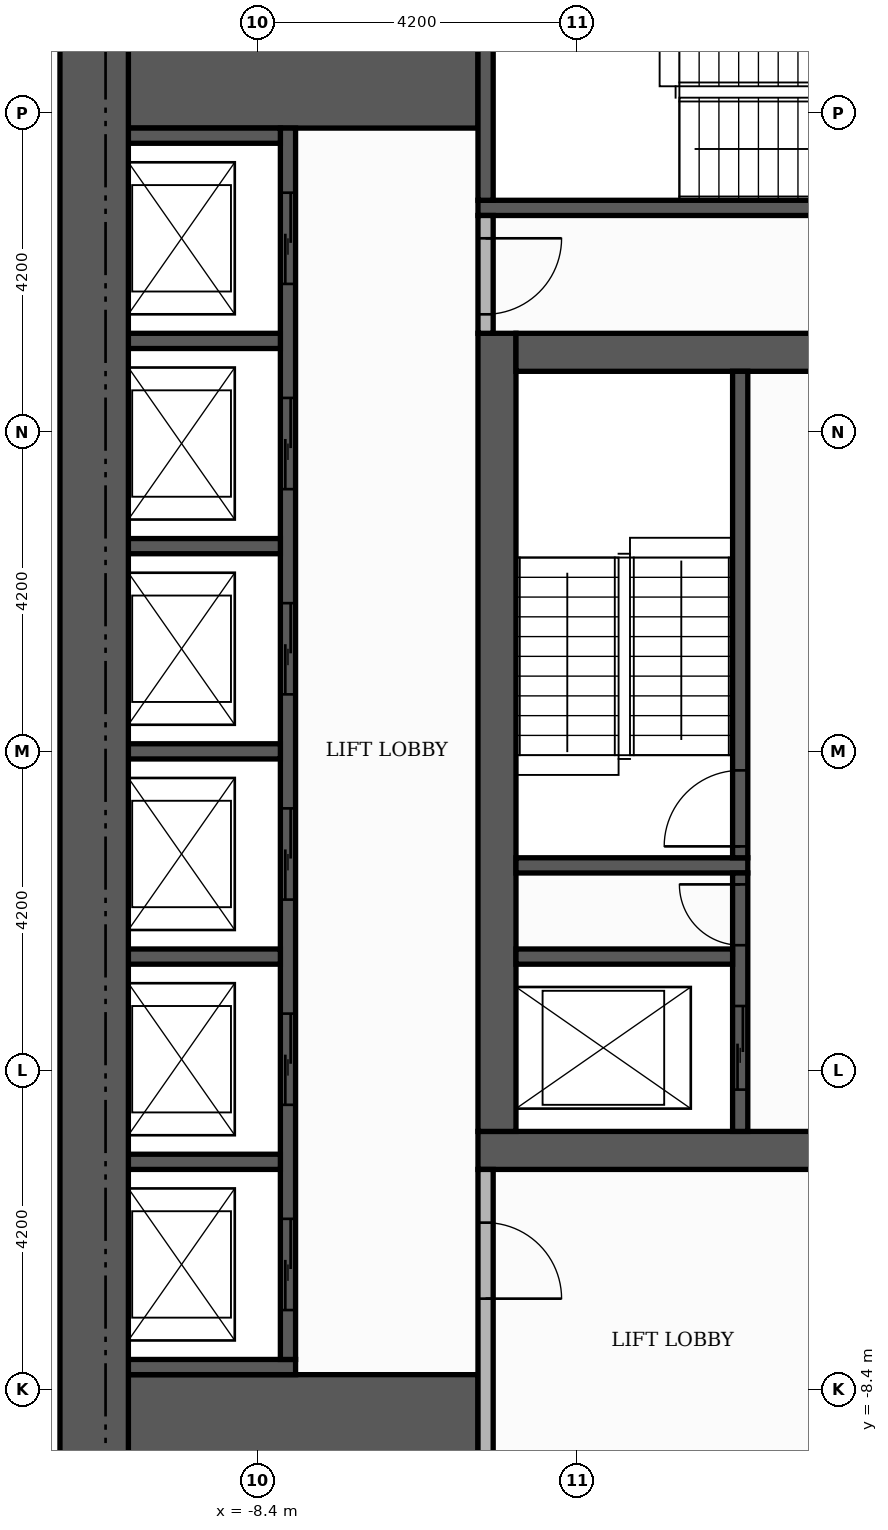
"""IFC4 building model, lengths in metres.
Left out: names, types, materials, properties, quantities, classifications, styles, units other than length and angle.
Written with IfcOpenShell. Run it as: python <this file> out.ifc"""

import sys

from ifc_helpers import new_model, si_unit, direction, frame, frame_2d, origin, place, context, subcontext, project, spatial, rectangle, extrude, element, fill, save


model = new_model("IFC4")
c1 = context("Model", 3, precision=1e-05, world=origin(), true_north=direction((0.0, 1.0)))
c2 = subcontext(c1, "Body", "Model", "MODEL_VIEW")
j1 = project(units=[si_unit("LENGTHUNIT", "METRE"), si_unit("PLANEANGLEUNIT", "RADIAN")], contexts=[c1])
p1 = place(None, origin())
s1 = spatial("IfcSite", under=j1, at=p1, CompositionType="ELEMENT")
p2 = place(p1, origin())
s2 = spatial("IfcBuilding", under=s1, at=p2, CompositionType="ELEMENT")
p3 = place(p2, frame((0.0, 0.0, 54.3)))
s3 = spatial("IfcBuildingStorey", under=s2, at=p3, CompositionType="ELEMENT", Elevation=54.3)
p4 = place(p3, frame((-5.5, -5.25, 0.0), z_axis=(0.0, 0.0, 1.0), x_axis=(1.0, 0.0, 0.0)))
e1 = element("IfcWall", 1, at=p4, inside=s3, PredefinedType="SHEAR", context=c2, shape_type="SweptSolid", body=[
    extrude(rectangle(XDim=11.0, YDim=0.5, at=frame_2d((5.5, 0.0))), origin(), (0.0, 0.0, 1.0), 3.48),
])
p5 = place(p4, frame((4.9, 0.0, 0.0)))
e2 = element("IfcOpeningElement", 2, at=p5, cuts=e1, PredefinedType="OPENING", context=c2, shape_type="SweptSolid", body=[
    extrude(rectangle(XDim=1.2, YDim=2.1, at=frame_2d((0.6, 1.05))), frame((0.0, 0.26, 0.0), z_axis=(0.0, -1.0, 0.0), x_axis=(1.0, 0.0, 0.0)), (0.0, 0.0, 1.0), 0.52),
])
p6 = place(p3, frame((-5.25, -5.0, 0.0), z_axis=(0.0, 0.0, 1.0), x_axis=(0.0, 1.0, 0.0)))
e3 = element("IfcWall", 3, at=p6, inside=s3, PredefinedType="SHEAR", context=c2, shape_type="SweptSolid", body=[
    extrude(rectangle(XDim=10.5, YDim=0.5, at=frame_2d((5.25, 0.0))), origin(), (0.0, 0.0, 1.0), 3.48),
])
p7 = place(p3, frame((-5.0, 5.25, 0.0), z_axis=(0.0, 0.0, 1.0), x_axis=(1.0, 0.0, 0.0)))
e4 = element("IfcWall", 4, at=p7, inside=s3, PredefinedType="SHEAR", context=c2, shape_type="SweptSolid", body=[
    extrude(rectangle(XDim=10.0, YDim=0.5, at=frame_2d((5.0, 0.0))), origin(), (0.0, 0.0, 1.0), 3.48),
])
p8 = place(p7, frame((4.4, 0.0, 0.0)))
e5 = element("IfcOpeningElement", 5, at=p8, cuts=e4, PredefinedType="OPENING", context=c2, shape_type="SweptSolid", body=[
    extrude(rectangle(XDim=1.2, YDim=2.1, at=frame_2d((0.6, 1.05))), frame((0.0, 0.26, 0.0), z_axis=(0.0, -1.0, 0.0), x_axis=(1.0, 0.0, 0.0)), (0.0, 0.0, 1.0), 0.52),
])
for number, where, z_axis, x_axis in (
    (6, (-10.1, -9.15, 0.0), (0.0, 0.0, 1.0), (1.0, 0.0, 0.0)),
    (7, (-10.1, 9.15, 0.0), (0.0, 0.0, 1.0), (1.0, 0.0, 0.0)),
):
    element("IfcWall", number, at=place(p3, frame(where, z_axis=z_axis, x_axis=x_axis)), inside=s3, PredefinedType="SHEAR", context=c2, shape_type="SweptSolid", body=[
        extrude(rectangle(XDim=4.6, YDim=1.9, at=frame_2d((2.3, 0.0))), origin(), (0.0, 0.0, 1.0), 3.48),
    ])
p9 = place(p3, frame((-5.0, -1.5, 0.0), z_axis=(0.0, 0.0, 1.0), x_axis=(1.0, 0.0, 0.0)))
e8 = element("IfcWall", 8, at=p9, inside=s3, PredefinedType="SHEAR", context=c2, shape_type="SweptSolid", body=[
    extrude(rectangle(XDim=3.05, YDim=0.2, at=frame_2d((1.525, 0.0))), origin(), (0.0, 0.0, 1.0), 3.48),
])
p10 = place(p3, frame((-2.05, -1.4, 0.0), z_axis=(0.0, 0.0, 1.0), x_axis=(0.0, 1.0, 0.0)))
e9 = element("IfcWall", 9, at=p10, inside=s3, PredefinedType="SHEAR", context=c2, shape_type="SweptSolid", body=[
    extrude(rectangle(XDim=6.4, YDim=0.2, at=frame_2d((3.2, 0.0))), origin(), (0.0, 0.0, 1.0), 3.48),
])
p11 = place(p10, frame((0.15, 0.0, 0.0)))
e10 = element("IfcOpeningElement", 10, at=p11, cuts=e9, PredefinedType="OPENING", context=c2, shape_type="SweptSolid", body=[
    extrude(rectangle(XDim=1.0, YDim=2.1, at=frame_2d((0.5, 1.05))), frame((0.0, 0.11, 0.0), z_axis=(0.0, -1.0, 0.0), x_axis=(1.0, 0.0, 0.0)), (0.0, 0.0, 1.0), 0.22),
])
p12 = place(p3, frame((-5.5, 7.15, 0.0), z_axis=(0.0, 0.0, 1.0), x_axis=(1.0, 0.0, 0.0)))
e11 = element("IfcWall", 11, at=p12, inside=s3, PredefinedType="SHEAR", context=c2, shape_type="SweptSolid", body=[
    extrude(rectangle(XDim=6.8, YDim=0.2, at=frame_2d((3.4, 0.0))), origin(), (0.0, 0.0, 1.0), 3.48),
])
p13 = place(p3, frame((-5.4, 7.25, 0.0), z_axis=(0.0, 0.0, 1.0), x_axis=(0.0, 1.0, 0.0)))
e12 = element("IfcWall", 12, at=p13, inside=s3, PredefinedType="SHEAR", context=c2, shape_type="SweptSolid", body=[
    extrude(rectangle(XDim=2.85, YDim=0.2, at=frame_2d((1.425, 0.0))), origin(), (0.0, 0.0, 1.0), 3.48),
])
p14 = place(p3, frame((-10.1, -8.1, 0.0), z_axis=(0.0, 0.0, 1.0), x_axis=(1.0, 0.0, 0.0)))
e13 = element("IfcWall", 13, at=p14, inside=s3, PredefinedType="SHEAR", context=c2, shape_type="SweptSolid", body=[
    extrude(rectangle(XDim=2.2, YDim=0.2, at=frame_2d((1.1, 0.0))), origin(), (0.0, 0.0, 1.0), 3.48),
])
p15 = place(p3, frame((-8.0, -8.0, 0.0), z_axis=(0.0, 0.0, 1.0), x_axis=(0.0, 1.0, 0.0)))
e14 = element("IfcWall", 14, at=p15, inside=s3, PredefinedType="SHEAR", context=c2, shape_type="SweptSolid", body=[
    extrude(rectangle(XDim=16.2, YDim=0.2, at=frame_2d((8.1, 0.0))), origin(), (0.0, 0.0, 1.0), 3.48),
])
p16 = place(p15, frame((0.65, 0.0, 0.0)))
e15 = element("IfcOpeningElement", 15, at=p16, cuts=e14, PredefinedType="OPENING", context=c2, shape_type="SweptSolid", body=[
    extrude(rectangle(XDim=1.2, YDim=2.1, at=frame_2d((0.6, 1.05))), frame((0.0, 0.11, 0.0), z_axis=(0.0, -1.0, 0.0), x_axis=(1.0, 0.0, 0.0)), (0.0, 0.0, 1.0), 0.22),
])
p17 = place(p15, frame((3.35, 0.0, 0.0)))
e16 = element("IfcOpeningElement", 16, at=p17, cuts=e14, PredefinedType="OPENING", context=c2, shape_type="SweptSolid", body=[
    extrude(rectangle(XDim=1.2, YDim=2.1, at=frame_2d((0.6, 1.05))), frame((0.0, 0.11, 0.0), z_axis=(0.0, -1.0, 0.0), x_axis=(1.0, 0.0, 0.0)), (0.0, 0.0, 1.0), 0.22),
])
p18 = place(p15, frame((6.05, 0.0, 0.0)))
e17 = element("IfcOpeningElement", 17, at=p18, cuts=e14, PredefinedType="OPENING", context=c2, shape_type="SweptSolid", body=[
    extrude(rectangle(XDim=1.2, YDim=2.1, at=frame_2d((0.6, 1.05))), frame((0.0, 0.11, 0.0), z_axis=(0.0, -1.0, 0.0), x_axis=(1.0, 0.0, 0.0)), (0.0, 0.0, 1.0), 0.22),
])
p19 = place(p15, frame((8.75, 0.0, 0.0)))
e18 = element("IfcOpeningElement", 18, at=p19, cuts=e14, PredefinedType="OPENING", context=c2, shape_type="SweptSolid", body=[
    extrude(rectangle(XDim=1.2, YDim=2.1, at=frame_2d((0.6, 1.05))), frame((0.0, 0.11, 0.0), z_axis=(0.0, -1.0, 0.0), x_axis=(1.0, 0.0, 0.0)), (0.0, 0.0, 1.0), 0.22),
])
p20 = place(p15, frame((11.45, 0.0, 0.0)))
e19 = element("IfcOpeningElement", 19, at=p20, cuts=e14, PredefinedType="OPENING", context=c2, shape_type="SweptSolid", body=[
    extrude(rectangle(XDim=1.2, YDim=2.1, at=frame_2d((0.6, 1.05))), frame((0.0, 0.11, 0.0), z_axis=(0.0, -1.0, 0.0), x_axis=(1.0, 0.0, 0.0)), (0.0, 0.0, 1.0), 0.22),
])
p21 = place(p15, frame((14.15, 0.0, 0.0)))
e20 = element("IfcOpeningElement", 20, at=p21, cuts=e14, PredefinedType="OPENING", context=c2, shape_type="SweptSolid", body=[
    extrude(rectangle(XDim=1.2, YDim=2.1, at=frame_2d((0.6, 1.05))), frame((0.0, 0.11, 0.0), z_axis=(0.0, -1.0, 0.0), x_axis=(1.0, 0.0, 0.0)), (0.0, 0.0, 1.0), 0.22),
])
p22 = place(p3, frame((-10.1, -5.4, 0.0), z_axis=(0.0, 0.0, 1.0), x_axis=(1.0, 0.0, 0.0)))
e21 = element("IfcWall", 21, at=p22, inside=s3, PredefinedType="SHEAR", context=c2, shape_type="SweptSolid", body=[
    extrude(rectangle(XDim=2.0, YDim=0.2, at=frame_2d((1.0, 0.0))), origin(), (0.0, 0.0, 1.0), 3.48),
])
p23 = place(p3, frame((-2.05, -5.0, 0.0), z_axis=(0.0, 0.0, 1.0), x_axis=(0.0, 1.0, 0.0)))
e22 = element("IfcWall", 22, at=p23, inside=s3, PredefinedType="SHEAR", context=c2, shape_type="SweptSolid", body=[
    extrude(rectangle(XDim=3.4, YDim=0.2, at=frame_2d((1.7, 0.0))), origin(), (0.0, 0.0, 1.0), 3.48),
])
p24 = place(p23, frame((0.55, 0.0, 0.0)))
e23 = element("IfcOpeningElement", 23, at=p24, cuts=e22, PredefinedType="OPENING", context=c2, shape_type="SweptSolid", body=[
    extrude(rectangle(XDim=1.1, YDim=2.1, at=frame_2d((0.55, 1.05))), frame((0.0, 0.11, 0.0), z_axis=(0.0, -1.0, 0.0), x_axis=(1.0, 0.0, 0.0)), (0.0, 0.0, 1.0), 0.22),
])
p25 = place(p23, frame((2.45, 0.0, 0.0)))
e24 = element("IfcOpeningElement", 24, at=p25, cuts=e22, PredefinedType="OPENING", context=c2, shape_type="SweptSolid", body=[
    extrude(rectangle(XDim=0.8, YDim=2.1, at=frame_2d((0.4, 1.05))), frame((0.0, 0.11, 0.0), z_axis=(0.0, -1.0, 0.0), x_axis=(1.0, 0.0, 0.0)), (0.0, 0.0, 1.0), 0.22),
])
p26 = place(p3, frame((-10.1, -2.7, 0.0), z_axis=(0.0, 0.0, 1.0), x_axis=(1.0, 0.0, 0.0)))
e25 = element("IfcWall", 25, at=p26, inside=s3, PredefinedType="SHEAR", context=c2, shape_type="SweptSolid", body=[
    extrude(rectangle(XDim=2.0, YDim=0.2, at=frame_2d((1.0, 0.0))), origin(), (0.0, 0.0, 1.0), 3.48),
])
p27 = place(p3, frame((-5.0, -2.7, 0.0), z_axis=(0.0, 0.0, 1.0), x_axis=(1.0, 0.0, 0.0)))
e26 = element("IfcWall", 26, at=p27, inside=s3, PredefinedType="SHEAR", context=c2, shape_type="SweptSolid", body=[
    extrude(rectangle(XDim=2.85, YDim=0.2, at=frame_2d((1.425, 0.0))), origin(), (0.0, 0.0, 1.0), 3.48),
])
for number, where, z_axis, x_axis in (
    (27, (-10.1, 0.0, 0.0), (0.0, 0.0, 1.0), (1.0, 0.0, 0.0)),
    (28, (-10.1, 2.7, 0.0), (0.0, 0.0, 1.0), (1.0, 0.0, 0.0)),
    (29, (-10.1, 5.4, 0.0), (0.0, 0.0, 1.0), (1.0, 0.0, 0.0)),
    (30, (-10.1, 8.1, 0.0), (0.0, 0.0, 1.0), (1.0, 0.0, 0.0)),
):
    element("IfcWall", number, at=place(p3, frame(where, z_axis=z_axis, x_axis=x_axis)), inside=s3, PredefinedType="SHEAR", context=c2, shape_type="SweptSolid", body=[
        extrude(rectangle(XDim=2.0, YDim=0.2, at=frame_2d((1.0, 0.0))), origin(), (0.0, 0.0, 1.0), 3.48),
    ])
p28 = place(p3, frame((-10.55, -10.1, 0.0), z_axis=(0.0, 0.0, 1.0), x_axis=(0.0, 1.0, 0.0)))
e31 = element("IfcWall", 31, at=p28, inside=s3, PredefinedType="SHEAR", context=c2, shape_type="SweptSolid", body=[
    extrude(rectangle(XDim=20.2, YDim=0.9, at=frame_2d((10.1, 0.0))), origin(), (0.0, 0.0, 1.0), 3.48),
])
p29 = place(p3, frame((-5.4, -10.1, 0.0), z_axis=(0.0, 0.0, 1.0), x_axis=(0.0, 1.0, 0.0)))
e32 = element("IfcWall", 32, at=p29, inside=s3, PredefinedType="PARTITIONING", context=c2, shape_type="SweptSolid", body=[
    extrude(rectangle(XDim=4.6, YDim=0.2, at=frame_2d((2.3, 0.0))), origin(), (0.0, 0.0, 1.0), 3.48),
])
p30 = place(p29, frame((2.9, 0.0, 0.0)))
e33 = element("IfcOpeningElement", 33, at=p30, cuts=e32, PredefinedType="OPENING", context=c2, shape_type="SweptSolid", body=[
    extrude(rectangle(XDim=1.0, YDim=2.1, at=frame_2d((0.5, 1.05))), frame((0.0, 0.11, 0.0), z_axis=(0.0, -1.0, 0.0), x_axis=(1.0, 0.0, 0.0)), (0.0, 0.0, 1.0), 0.22),
])
p31 = place(p3, frame((-5.4, 5.5, 0.0), z_axis=(0.0, 0.0, 1.0), x_axis=(0.0, 1.0, 0.0)))
e34 = element("IfcWall", 34, at=p31, inside=s3, PredefinedType="PARTITIONING", context=c2, shape_type="SweptSolid", body=[
    extrude(rectangle(XDim=1.55, YDim=0.2, at=frame_2d((0.775, 0.0))), origin(), (0.0, 0.0, 1.0), 3.48),
])
p32 = place(p31, frame((0.25, 0.0, 0.0)))
e35 = element("IfcOpeningElement", 35, at=p32, cuts=e34, PredefinedType="OPENING", context=c2, shape_type="SweptSolid", body=[
    extrude(rectangle(XDim=1.0, YDim=2.1, at=frame_2d((0.5, 1.05))), frame((0.0, 0.11, 0.0), z_axis=(0.0, -1.0, 0.0), x_axis=(1.0, 0.0, 0.0)), (0.0, 0.0, 1.0), 0.22),
])
p33 = place(p16, origin())
e36 = element("IfcDoor", 36, at=p33, inside=s3, OperationType="SLIDING_TO_LEFT", PredefinedType="DOOR", context=c2, shape_type="SweptSolid", body=[
    extrude(rectangle(XDim=1.2, YDim=2.1, at=frame_2d((0.6, 1.05))), frame((0.0, 0.025, 0.0), z_axis=(0.0, -1.0, 0.0), x_axis=(1.0, 0.0, 0.0)), (0.0, 0.0, 1.0), 0.05),
])
fill(e15, e36)
p34 = place(p17, origin())
e37 = element("IfcDoor", 37, at=p34, inside=s3, OperationType="SLIDING_TO_LEFT", PredefinedType="DOOR", context=c2, shape_type="SweptSolid", body=[
    extrude(rectangle(XDim=1.2, YDim=2.1, at=frame_2d((0.6, 1.05))), frame((0.0, 0.025, 0.0), z_axis=(0.0, -1.0, 0.0), x_axis=(1.0, 0.0, 0.0)), (0.0, 0.0, 1.0), 0.05),
])
fill(e16, e37)
p35 = place(p18, origin())
e38 = element("IfcDoor", 38, at=p35, inside=s3, OperationType="SLIDING_TO_LEFT", PredefinedType="DOOR", context=c2, shape_type="SweptSolid", body=[
    extrude(rectangle(XDim=1.2, YDim=2.1, at=frame_2d((0.6, 1.05))), frame((0.0, 0.025, 0.0), z_axis=(0.0, -1.0, 0.0), x_axis=(1.0, 0.0, 0.0)), (0.0, 0.0, 1.0), 0.05),
])
fill(e17, e38)
p36 = place(p19, origin())
e39 = element("IfcDoor", 39, at=p36, inside=s3, OperationType="SLIDING_TO_LEFT", PredefinedType="DOOR", context=c2, shape_type="SweptSolid", body=[
    extrude(rectangle(XDim=1.2, YDim=2.1, at=frame_2d((0.6, 1.05))), frame((0.0, 0.025, 0.0), z_axis=(0.0, -1.0, 0.0), x_axis=(1.0, 0.0, 0.0)), (0.0, 0.0, 1.0), 0.05),
])
fill(e18, e39)
p37 = place(p20, origin())
e40 = element("IfcDoor", 40, at=p37, inside=s3, OperationType="SLIDING_TO_LEFT", PredefinedType="DOOR", context=c2, shape_type="SweptSolid", body=[
    extrude(rectangle(XDim=1.2, YDim=2.1, at=frame_2d((0.6, 1.05))), frame((0.0, 0.025, 0.0), z_axis=(0.0, -1.0, 0.0), x_axis=(1.0, 0.0, 0.0)), (0.0, 0.0, 1.0), 0.05),
])
fill(e19, e40)
p38 = place(p21, origin())
e41 = element("IfcDoor", 41, at=p38, inside=s3, OperationType="SLIDING_TO_LEFT", PredefinedType="DOOR", context=c2, shape_type="SweptSolid", body=[
    extrude(rectangle(XDim=1.2, YDim=2.1, at=frame_2d((0.6, 1.05))), frame((0.0, 0.025, 0.0), z_axis=(0.0, -1.0, 0.0), x_axis=(1.0, 0.0, 0.0)), (0.0, 0.0, 1.0), 0.05),
])
fill(e20, e41)
p39 = place(p24, origin())
e42 = element("IfcDoor", 42, at=p39, inside=s3, OperationType="SLIDING_TO_LEFT", PredefinedType="DOOR", context=c2, shape_type="SweptSolid", body=[
    extrude(rectangle(XDim=1.1, YDim=2.1, at=frame_2d((0.55, 1.05))), frame((0.0, 0.025, 0.0), z_axis=(0.0, -1.0, 0.0), x_axis=(1.0, 0.0, 0.0)), (0.0, 0.0, 1.0), 0.05),
])
fill(e23, e42)
p40 = place(p11, origin())
e43 = element("IfcDoor", 43, at=p40, inside=s3, OperationType="SINGLE_SWING_LEFT", PredefinedType="DOOR", context=c2, shape_type="SweptSolid", body=[
    extrude(rectangle(XDim=1.0, YDim=2.1, at=frame_2d((0.5, 1.05))), frame((0.0, 0.025, 0.0), z_axis=(0.0, -1.0, 0.0), x_axis=(1.0, 0.0, 0.0)), (0.0, 0.0, 1.0), 0.05),
])
fill(e10, e43)
p41 = place(p25, origin())
e44 = element("IfcDoor", 44, at=p41, inside=s3, OperationType="SINGLE_SWING_RIGHT", PredefinedType="DOOR", context=c2, shape_type="SweptSolid", body=[
    extrude(rectangle(XDim=0.8, YDim=2.1, at=frame_2d((0.4, 1.05))), frame((0.0, 0.025, 0.0), z_axis=(0.0, -1.0, 0.0), x_axis=(1.0, 0.0, 0.0)), (0.0, 0.0, 1.0), 0.05),
])
fill(e24, e44)
p42 = place(p32, frame((1.0, 0.0, 0.0), z_axis=(0.0, 0.0, 1.0), x_axis=(-1.0, 0.0, 0.0)))
e45 = element("IfcDoor", 45, at=p42, inside=s3, OperationType="SINGLE_SWING_RIGHT", PredefinedType="DOOR", context=c2, shape_type="SweptSolid", body=[
    extrude(rectangle(XDim=1.0, YDim=2.1, at=frame_2d((0.5, 1.05))), frame((0.0, 0.025, 0.0), z_axis=(0.0, -1.0, 0.0), x_axis=(1.0, 0.0, 0.0)), (0.0, 0.0, 1.0), 0.05),
])
fill(e35, e45)
p43 = place(p30, frame((1.0, 0.0, 0.0), z_axis=(0.0, 0.0, 1.0), x_axis=(-1.0, 0.0, 0.0)))
e46 = element("IfcDoor", 46, at=p43, inside=s3, OperationType="SINGLE_SWING_LEFT", PredefinedType="DOOR", context=c2, shape_type="SweptSolid", body=[
    extrude(rectangle(XDim=1.0, YDim=2.1, at=frame_2d((0.5, 1.05))), frame((0.0, 0.025, 0.0), z_axis=(0.0, -1.0, 0.0), x_axis=(1.0, 0.0, 0.0)), (0.0, 0.0, 1.0), 0.05),
])
fill(e33, e46)
save(model, sys.argv[1])
